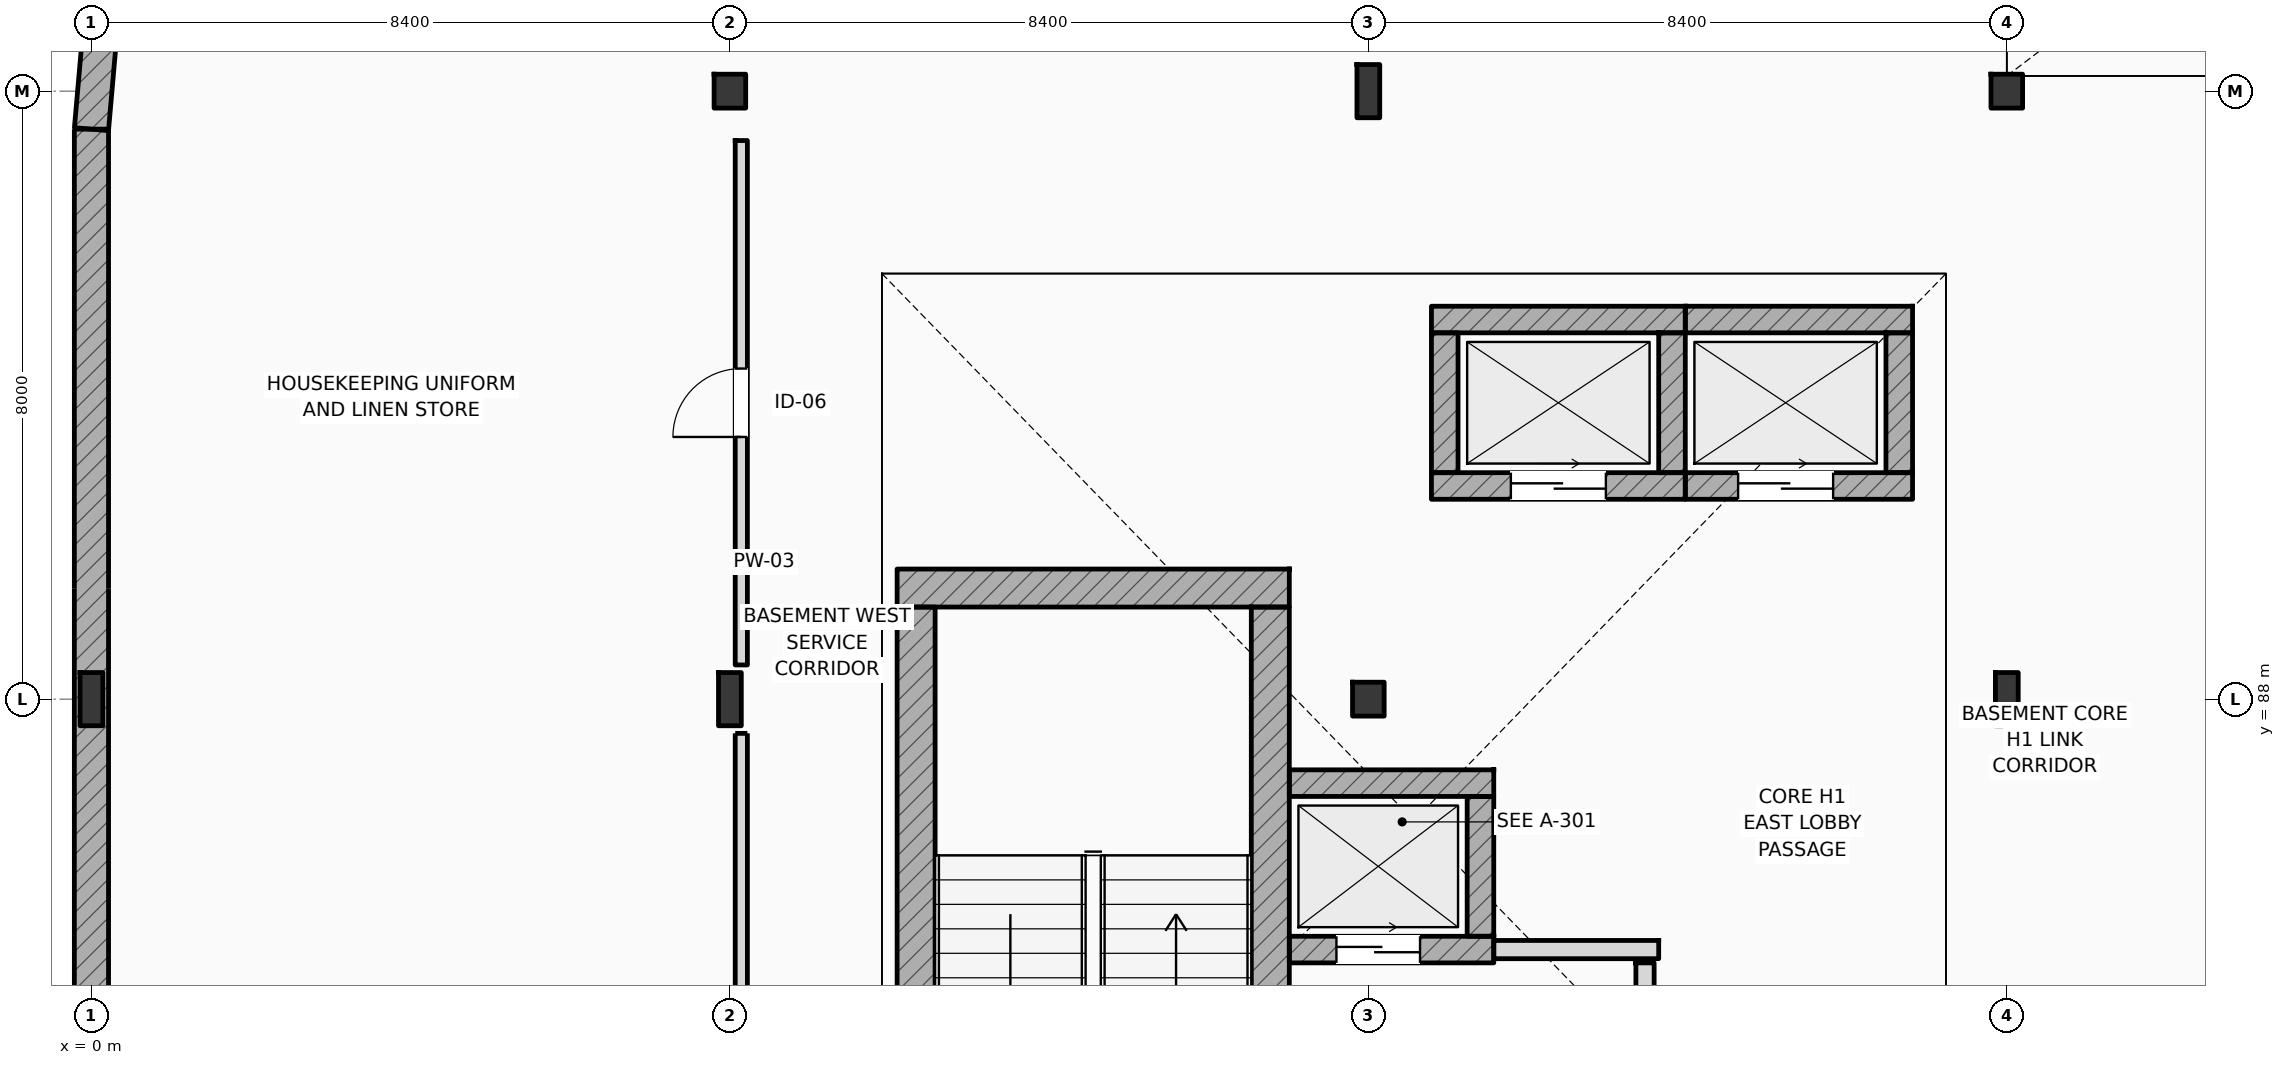
"""IFC4 building model, lengths in metres.
Left out: names, types, materials, properties, quantities, classifications, styles, units other than length and angle.
Written with IfcOpenShell. Run it as: python <this file> out.ifc"""

import sys

from ifc_helpers import new_model, si_unit, direction, frame, frame_2d, origin, origin_2d, place, context, subcontext, project, spatial, rectangle, i_section, extrude, element, fill, save


model = new_model("IFC4")
c1 = context("Model", 3, precision=1e-05, world=origin(), true_north=direction((0.0, 1.0)))
c2 = subcontext(c1, "Body", "Model", "MODEL_VIEW")
j1 = project(units=[si_unit("LENGTHUNIT", "METRE"), si_unit("PLANEANGLEUNIT", "RADIAN")], contexts=[c1])
p1 = place(None, origin())
s1 = spatial("IfcSite", under=j1, at=p1, CompositionType="ELEMENT")
p2 = place(p1, origin())
s2 = spatial("IfcBuilding", under=s1, at=p2, CompositionType="ELEMENT")
p3 = place(p2, frame((0.0, 0.0, -4.5)))
s3 = spatial("IfcBuildingStorey", under=s2, at=p3, CompositionType="ELEMENT", Elevation=-4.5)
p4 = place(p3, frame((0.342, 99.407, 0.0), z_axis=(0.0, 0.0, 1.0), x_axis=(-0.087150733665, -0.996195136317, 0.0)))
e1 = element("IfcWall", 1, at=p4, inside=s3, PredefinedType="SOLIDWALL", context=c2, shape_type="SweptSolid", body=[
    extrude(rectangle(XDim=3.922, YDim=0.45, at=frame_2d((1.961, 0.0))), origin(), (0.0, 0.0, 1.0), 4.5),
])
p5 = place(p3, frame((0.0, 95.5, 0.0), z_axis=(0.0, 0.0, 1.0), x_axis=(0.0, -1.0, 0.0)))
e2 = element("IfcWall", 2, at=p5, inside=s3, PredefinedType="SOLIDWALL", context=c2, shape_type="SweptSolid", body=[
    extrude(rectangle(XDim=33.0, YDim=0.45, at=frame_2d((16.5, 0.0))), origin(), (0.0, 0.0, 1.0), 4.5),
])
for number, where, z_axis, x_axis in (
    (3, (0.0, 88.0, 0.0), (0.0, 0.0, 1.0), (1.0, 0.0, 0.0)),
    (4, (8.4, 88.0, 0.0), (0.0, 0.0, 1.0), (1.0, 0.0, 0.0)),
):
    element("IfcColumn", number, at=place(p3, frame(where, z_axis=z_axis, x_axis=x_axis)), inside=s3, PredefinedType="COLUMN", context=c2, shape_type="SweptSolid", body=[
        extrude(i_section(OverallWidth=0.3, OverallDepth=0.7, WebThickness=0.017, FlangeThickness=0.032, FilletRadius=0.027, at=origin_2d()), origin(), (0.0, 0.0, 1.0), 4.5),
    ])
for number, where, z_axis, x_axis in (
    (5, (8.4, 96.0, 0.0), (0.0, 0.0, 1.0), (1.0, 0.0, 0.0)),
    (6, (16.8, 88.0, 0.0), (0.0, 0.0, 1.0), (1.0, 0.0, 0.0)),
):
    element("IfcColumn", number, at=place(p3, frame(where, z_axis=z_axis, x_axis=x_axis)), inside=s3, PredefinedType="COLUMN", context=c2, shape_type="SweptSolid", body=[
        extrude(i_section(OverallWidth=0.416, OverallDepth=0.446, WebThickness=0.036, FlangeThickness=0.048, FilletRadius=0.015, at=origin_2d()), origin(), (0.0, 0.0, 1.0), 4.5),
    ])
for number, where, z_axis, x_axis in (
    (7, (16.8, 96.0, 0.0), (0.0, 0.0, 1.0), (1.0, 0.0, 0.0)),
    (8, (25.2, 88.0, 0.0), (0.0, 0.0, 1.0), (1.0, 0.0, 0.0)),
):
    element("IfcColumn", number, at=place(p3, frame(where, z_axis=z_axis, x_axis=x_axis)), inside=s3, PredefinedType="COLUMN", context=c2, shape_type="SweptSolid", body=[
        extrude(i_section(OverallWidth=0.3, OverallDepth=0.7, WebThickness=0.017, FlangeThickness=0.032, FilletRadius=0.027, at=origin_2d()), origin(), (0.0, 0.0, 1.0), 4.5),
    ])
p6 = place(p3, frame((25.2, 96.0, 0.0), z_axis=(0.0, 0.0, 1.0), x_axis=(1.0, 0.0, 0.0)))
e9 = element("IfcColumn", 9, at=p6, inside=s3, PredefinedType="COLUMN", context=c2, shape_type="SweptSolid", body=[
    extrude(i_section(OverallWidth=0.416, OverallDepth=0.446, WebThickness=0.036, FlangeThickness=0.048, FilletRadius=0.015, at=origin_2d()), origin(), (0.0, 0.0, 1.0), 4.5),
])
p7 = place(p3, frame((10.6, 89.462, 0.0), z_axis=(0.0, 0.0, 1.0), x_axis=(1.0, 0.0, 0.0)))
e10 = element("IfcWall", 10, at=p7, inside=s3, PredefinedType="SHEAR", context=c2, shape_type="SweptSolid", body=[
    extrude(rectangle(XDim=5.16, YDim=0.5, at=frame_2d((2.58, 0.0))), origin(), (0.0, 0.0, 1.0), 4.5),
])
p8 = place(p3, frame((10.85, 80.1, 0.0), z_axis=(0.0, 0.0, 1.0), x_axis=(0.0, 1.0, 0.0)))
e11 = element("IfcWall", 11, at=p8, inside=s3, PredefinedType="SHEAR", context=c2, shape_type="SweptSolid", body=[
    extrude(rectangle(XDim=9.112, YDim=0.5, at=frame_2d((4.556, 0.0))), origin(), (0.0, 0.0, 1.0), 4.5),
])
p9 = place(p3, frame((15.51, 80.1, 0.0), z_axis=(0.0, 0.0, 1.0), x_axis=(0.0, 1.0, 0.0)))
e12 = element("IfcWall", 12, at=p9, inside=s3, PredefinedType="SHEAR", context=c2, shape_type="SweptSolid", body=[
    extrude(rectangle(XDim=9.112, YDim=0.5, at=frame_2d((4.556, 0.0))), origin(), (0.0, 0.0, 1.0), 4.5),
])
p10 = place(p9, frame((0.44, 0.0, 0.0)))
e13 = element("IfcOpeningElement", 13, at=p10, cuts=e12, PredefinedType="OPENING", context=c2, shape_type="SweptSolid", body=[
    extrude(rectangle(XDim=1.1, YDim=2.2, at=frame_2d((0.55, 1.1))), frame((0.0, 0.26, 0.0), z_axis=(0.0, -1.0, 0.0), x_axis=(1.0, 0.0, 0.0)), (0.0, 0.0, 1.0), 0.52),
])
p11 = place(p3, frame((15.76, 86.895, 0.0), z_axis=(0.0, 0.0, 1.0), x_axis=(1.0, 0.0, 0.0)))
e14 = element("IfcWall", 14, at=p11, inside=s3, PredefinedType="SHEAR", context=c2, shape_type="SweptSolid", body=[
    extrude(rectangle(XDim=2.69, YDim=0.35, at=frame_2d((1.345, 0.0))), origin(), (0.0, 0.0, 1.0), 4.1),
])
p12 = place(p3, frame((15.76, 84.705, 0.0), z_axis=(0.0, 0.0, 1.0), x_axis=(1.0, 0.0, 0.0)))
e15 = element("IfcWall", 15, at=p12, inside=s3, PredefinedType="SHEAR", context=c2, shape_type="SweptSolid", body=[
    extrude(rectangle(XDim=2.69, YDim=0.35, at=frame_2d((1.345, 0.0))), origin(), (0.0, 0.0, 1.0), 4.1),
])
p13 = place(p12, frame((0.62, 0.0, 0.0)))
e16 = element("IfcOpeningElement", 16, at=p13, cuts=e15, PredefinedType="OPENING", context=c2, shape_type="SweptSolid", body=[
    extrude(rectangle(XDim=1.1, YDim=2.2, at=frame_2d((0.55, 1.1))), frame((0.0, 0.185, 0.0), z_axis=(0.0, -1.0, 0.0), x_axis=(1.0, 0.0, 0.0)), (0.0, 0.0, 1.0), 0.37),
])
p14 = place(p3, frame((18.275, 84.88, 0.0), z_axis=(0.0, 0.0, 1.0), x_axis=(0.0, 1.0, 0.0)))
e17 = element("IfcWall", 17, at=p14, inside=s3, PredefinedType="SHEAR", context=c2, shape_type="SweptSolid", body=[
    extrude(rectangle(XDim=1.84, YDim=0.35, at=frame_2d((0.92, 0.0))), origin(), (0.0, 0.0, 1.0), 4.1),
])
p15 = place(p3, frame((17.63, 92.995, 0.0), z_axis=(0.0, 0.0, 1.0), x_axis=(1.0, 0.0, 0.0)))
e18 = element("IfcWall", 18, at=p15, inside=s3, PredefinedType="SHEAR", context=c2, shape_type="SweptSolid", body=[
    extrude(rectangle(XDim=3.34, YDim=0.35, at=frame_2d((1.67, 0.0))), origin(), (0.0, 0.0, 1.0), 4.1),
])
p16 = place(p3, frame((17.63, 90.805, 0.0), z_axis=(0.0, 0.0, 1.0), x_axis=(1.0, 0.0, 0.0)))
e19 = element("IfcWall", 19, at=p16, inside=s3, PredefinedType="SHEAR", context=c2, shape_type="SweptSolid", body=[
    extrude(rectangle(XDim=3.34, YDim=0.35, at=frame_2d((1.67, 0.0))), origin(), (0.0, 0.0, 1.0), 4.1),
])
p17 = place(p16, frame((1.045, 0.0, 0.0)))
e20 = element("IfcOpeningElement", 20, at=p17, cuts=e19, PredefinedType="OPENING", context=c2, shape_type="SweptSolid", body=[
    extrude(rectangle(XDim=1.25, YDim=2.25, at=frame_2d((0.625, 1.125))), frame((0.0, 0.185, 0.0), z_axis=(0.0, -1.0, 0.0), x_axis=(1.0, 0.0, 0.0)), (0.0, 0.0, 1.0), 0.37),
])
for number, where, z_axis, x_axis in (
    (21, (17.805, 90.98, 0.0), (0.0, 0.0, 1.0), (0.0, 1.0, 0.0)),
    (22, (20.795, 90.98, 0.0), (0.0, 0.0, 1.0), (0.0, 1.0, 0.0)),
):
    element("IfcWall", number, at=place(p3, frame(where, z_axis=z_axis, x_axis=x_axis)), inside=s3, PredefinedType="SHEAR", context=c2, shape_type="SweptSolid", body=[
        extrude(rectangle(XDim=1.84, YDim=0.35, at=frame_2d((0.92, 0.0))), origin(), (0.0, 0.0, 1.0), 4.1),
    ])
p18 = place(p3, frame((20.97, 92.995, 0.0), z_axis=(0.0, 0.0, 1.0), x_axis=(1.0, 0.0, 0.0)))
e23 = element("IfcWall", 23, at=p18, inside=s3, PredefinedType="SHEAR", context=c2, shape_type="SweptSolid", body=[
    extrude(rectangle(XDim=2.99, YDim=0.35, at=frame_2d((1.495, 0.0))), origin(), (0.0, 0.0, 1.0), 4.1),
])
p19 = place(p3, frame((20.97, 90.805, 0.0), z_axis=(0.0, 0.0, 1.0), x_axis=(1.0, 0.0, 0.0)))
e24 = element("IfcWall", 24, at=p19, inside=s3, PredefinedType="SHEAR", context=c2, shape_type="SweptSolid", body=[
    extrude(rectangle(XDim=2.99, YDim=0.35, at=frame_2d((1.495, 0.0))), origin(), (0.0, 0.0, 1.0), 4.1),
])
p20 = place(p19, frame((0.695, 0.0, 0.0)))
e25 = element("IfcOpeningElement", 25, at=p20, cuts=e24, PredefinedType="OPENING", context=c2, shape_type="SweptSolid", body=[
    extrude(rectangle(XDim=1.25, YDim=2.25, at=frame_2d((0.625, 1.125))), frame((0.0, 0.185, 0.0), z_axis=(0.0, -1.0, 0.0), x_axis=(1.0, 0.0, 0.0)), (0.0, 0.0, 1.0), 0.37),
])
p21 = place(p3, frame((23.785, 90.98, 0.0), z_axis=(0.0, 0.0, 1.0), x_axis=(0.0, 1.0, 0.0)))
e26 = element("IfcWall", 26, at=p21, inside=s3, PredefinedType="SHEAR", context=c2, shape_type="SweptSolid", body=[
    extrude(rectangle(XDim=1.84, YDim=0.35, at=frame_2d((0.92, 0.0))), origin(), (0.0, 0.0, 1.0), 4.1),
])
p22 = place(p3, frame((18.45, 84.705, 0.0), z_axis=(0.0, 0.0, 1.0), x_axis=(1.0, 0.0, 0.0)))
e27 = element("IfcWall", 27, at=p22, inside=s3, PredefinedType="STANDARD", context=c2, shape_type="SweptSolid", body=[
    extrude(rectangle(XDim=2.17, YDim=0.24, at=frame_2d((1.085, 0.0))), origin(), (0.0, 0.0, 1.0), 4.1),
])
p23 = place(p3, frame((20.44, 80.08, 0.0), z_axis=(0.0, 0.0, 1.0), x_axis=(0.0, 1.0, 0.0)))
e28 = element("IfcWall", 28, at=p23, inside=s3, PredefinedType="STANDARD", context=c2, shape_type="SweptSolid", body=[
    extrude(rectangle(XDim=4.45, YDim=0.24, at=frame_2d((2.225, 0.0))), origin(), (0.0, 0.0, 1.0), 4.1),
])
p24 = place(p23, frame((1.65, 0.0, 0.0)))
e29 = element("IfcOpeningElement", 29, at=p24, cuts=e28, PredefinedType="OPENING", context=c2, shape_type="SweptSolid", body=[
    extrude(rectangle(XDim=1.1, YDim=2.2, at=frame_2d((0.55, 1.1))), frame((0.0, 0.13, 0.0), z_axis=(0.0, -1.0, 0.0), x_axis=(1.0, 0.0, 0.0)), (0.0, 0.0, 1.0), 0.26),
])
p25 = place(p3, frame((8.55, 63.25, 0.0), z_axis=(0.0, 0.0, 1.0), x_axis=(0.0, 1.0, 0.0)))
e30 = element("IfcWall", 30, at=p25, inside=s3, PredefinedType="PARTITIONING", context=c2, shape_type="SweptSolid", body=[
    extrude(rectangle(XDim=24.3, YDim=0.16, at=frame_2d((12.15, 0.0))), origin(), (0.0, 0.0, 1.0), 3.6),
])
p26 = place(p25, frame((11.5, 0.0, 0.0)))
e31 = element("IfcOpeningElement", 31, at=p26, cuts=e30, PredefinedType="OPENING", context=c2, shape_type="SweptSolid", body=[
    extrude(rectangle(XDim=1.3, YDim=2.2, at=frame_2d((0.65, 1.1))), frame((0.0, 0.09, 0.0), z_axis=(0.0, -1.0, 0.0), x_axis=(1.0, 0.0, 0.0)), (0.0, 0.0, 1.0), 0.18),
])
p27 = place(p3, frame((8.55, 88.45, 0.0), z_axis=(0.0, 0.0, 1.0), x_axis=(0.0, 1.0, 0.0)))
e32 = element("IfcWall", 32, at=p27, inside=s3, PredefinedType="PARTITIONING", context=c2, shape_type="SweptSolid", body=[
    extrude(rectangle(XDim=6.9, YDim=0.16, at=frame_2d((3.45, 0.0))), origin(), (0.0, 0.0, 1.0), 3.64),
])
p28 = place(p27, frame((3.0, 0.0, 0.0)))
e33 = element("IfcOpeningElement", 33, at=p28, cuts=e32, PredefinedType="OPENING", context=c2, shape_type="SweptSolid", body=[
    extrude(rectangle(XDim=0.9, YDim=2.04, at=frame_2d((0.45, 1.02))), frame((0.0, 0.09, 0.0), z_axis=(0.0, -1.0, 0.0), x_axis=(1.0, 0.0, 0.0)), (0.0, 0.0, 1.0), 0.18),
])
p29 = place(p13, origin())
e34 = element("IfcDoor", 34, at=p29, inside=s3, OperationType="SLIDING_TO_LEFT", PredefinedType="DOOR", context=c2, shape_type="SweptSolid", body=[
    extrude(rectangle(XDim=1.1, YDim=2.2, at=frame_2d((0.55, 1.1))), frame((0.0, 0.025, 0.0), z_axis=(0.0, -1.0, 0.0), x_axis=(1.0, 0.0, 0.0)), (0.0, 0.0, 1.0), 0.05),
])
fill(e16, e34)
p30 = place(p17, origin())
e35 = element("IfcDoor", 35, at=p30, inside=s3, OperationType="SLIDING_TO_LEFT", PredefinedType="DOOR", context=c2, shape_type="SweptSolid", body=[
    extrude(rectangle(XDim=1.25, YDim=2.25, at=frame_2d((0.625, 1.125))), frame((0.0, 0.025, 0.0), z_axis=(0.0, -1.0, 0.0), x_axis=(1.0, 0.0, 0.0)), (0.0, 0.0, 1.0), 0.05),
])
fill(e20, e35)
p31 = place(p20, origin())
e36 = element("IfcDoor", 36, at=p31, inside=s3, OperationType="SLIDING_TO_LEFT", PredefinedType="DOOR", context=c2, shape_type="SweptSolid", body=[
    extrude(rectangle(XDim=1.25, YDim=2.25, at=frame_2d((0.625, 1.125))), frame((0.0, 0.025, 0.0), z_axis=(0.0, -1.0, 0.0), x_axis=(1.0, 0.0, 0.0)), (0.0, 0.0, 1.0), 0.05),
])
fill(e25, e36)
p32 = place(p28, origin())
e37 = element("IfcDoor", 37, at=p32, inside=s3, OperationType="SINGLE_SWING_LEFT", PredefinedType="DOOR", context=c2, shape_type="SweptSolid", body=[
    extrude(rectangle(XDim=0.9, YDim=2.04, at=frame_2d((0.45, 1.02))), frame((0.0, 0.025, 0.0), z_axis=(0.0, -1.0, 0.0), x_axis=(1.0, 0.0, 0.0)), (0.0, 0.0, 1.0), 0.05),
])
fill(e33, e37)
save(model, sys.argv[1])
